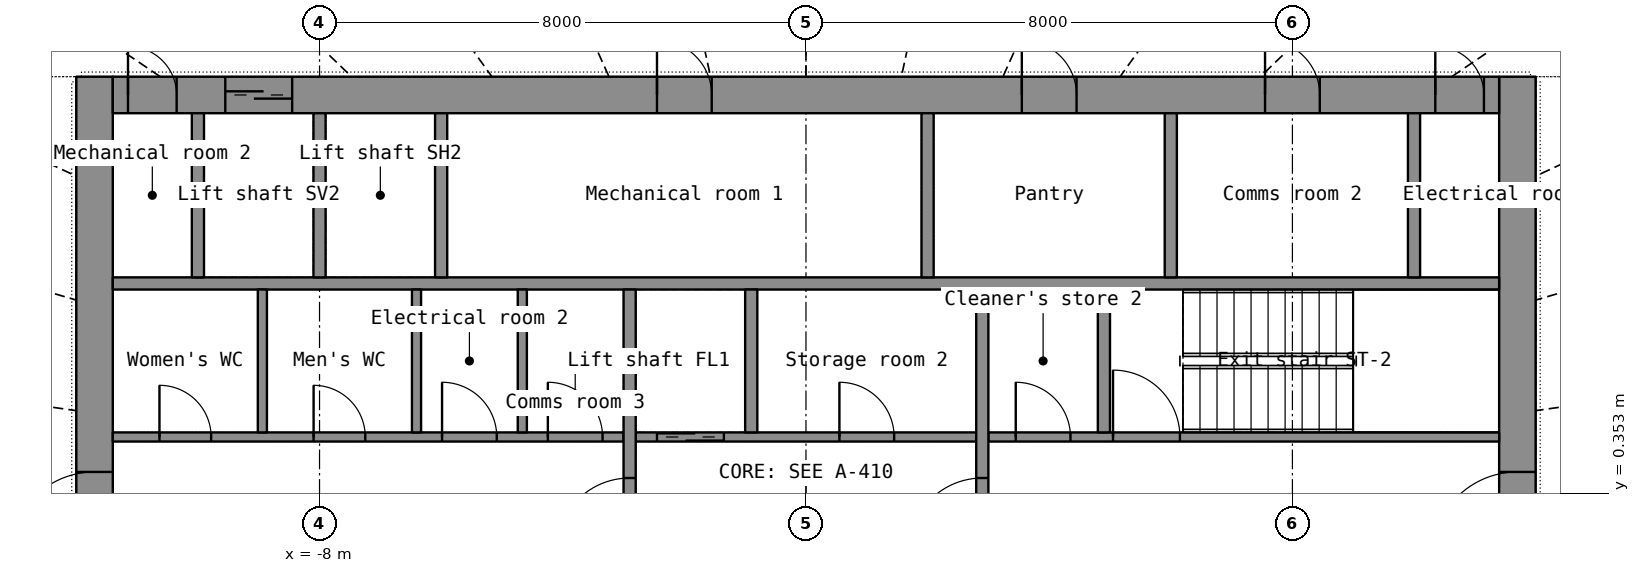
"""IFC4 building model, lengths in metres.
Left out: names, types, materials, properties, quantities, classifications, styles, units other than length and angle.
Written with IfcOpenShell. Run it as: python <this file> out.ifc"""

import sys

from ifc_helpers import new_model, si_unit, direction, frame, frame_2d, origin, place, context, subcontext, project, spatial, rectangle, extrude, element, fill, save


model = new_model("IFC4")
c1 = context("Model", 3, precision=1e-05, world=origin(), true_north=direction((0.0, 1.0)))
c2 = subcontext(c1, "Body", "Model", "MODEL_VIEW")
j1 = project(units=[si_unit("LENGTHUNIT", "METRE"), si_unit("PLANEANGLEUNIT", "RADIAN")], contexts=[c1])
p1 = place(None, origin())
s1 = spatial("IfcSite", under=j1, at=p1, CompositionType="ELEMENT")
p2 = place(p1, origin())
s2 = spatial("IfcBuilding", under=s1, at=p2, CompositionType="ELEMENT")
p3 = place(p2, frame((0.0, 0.0, 63.0)))
s3 = spatial("IfcBuildingStorey", under=s2, at=p3, CompositionType="ELEMENT", Elevation=63.0)
p4 = place(p3, frame((-11.7, -7.2, 0.0), z_axis=(0.0, 0.0, 1.0), x_axis=(0.0, 1.0, 0.0)))
e1 = element("IfcWall", 1, at=p4, inside=s3, PredefinedType="SHEAR", context=c2, shape_type="SweptSolid", body=[
    extrude(rectangle(XDim=14.4, YDim=0.6, at=frame_2d((7.2, 0.0))), origin(), (0.0, 0.0, 1.0), 3.3),
])
p5 = place(p4, frame((6.5, 0.0, 0.0)))
e2 = element("IfcOpeningElement", 2, at=p5, cuts=e1, PredefinedType="OPENING", context=c2, shape_type="SweptSolid", body=[
    extrude(rectangle(XDim=1.4, YDim=2.2, at=frame_2d((0.7, 1.1))), frame((0.0, 0.31, 0.0), z_axis=(0.0, -1.0, 0.0), x_axis=(1.0, 0.0, 0.0)), (0.0, 0.0, 1.0), 0.62),
])
p6 = place(p3, frame((11.7, -7.2, 0.0), z_axis=(0.0, 0.0, 1.0), x_axis=(0.0, 1.0, 0.0)))
e3 = element("IfcWall", 3, at=p6, inside=s3, PredefinedType="SHEAR", context=c2, shape_type="SweptSolid", body=[
    extrude(rectangle(XDim=14.4, YDim=0.6, at=frame_2d((7.2, 0.0))), origin(), (0.0, 0.0, 1.0), 3.3),
])
p7 = place(p6, frame((6.5, 0.0, 0.0)))
e4 = element("IfcOpeningElement", 4, at=p7, cuts=e3, PredefinedType="OPENING", context=c2, shape_type="SweptSolid", body=[
    extrude(rectangle(XDim=1.4, YDim=2.2, at=frame_2d((0.7, 1.1))), frame((0.0, 0.31, 0.0), z_axis=(0.0, -1.0, 0.0), x_axis=(1.0, 0.0, 0.0)), (0.0, 0.0, 1.0), 0.62),
])
p8 = place(p3, frame((-11.4, 6.9, 0.0), z_axis=(0.0, 0.0, 1.0), x_axis=(1.0, 0.0, 0.0)))
e5 = element("IfcWall", 5, at=p8, inside=s3, PredefinedType="SHEAR", context=c2, shape_type="SweptSolid", body=[
    extrude(rectangle(XDim=22.8, YDim=0.6, at=frame_2d((11.4, 0.0))), origin(), (0.0, 0.0, 1.0), 3.3),
])
p9 = place(p8, frame((1.85, 0.0, 0.0)))
e6 = element("IfcOpeningElement", 6, at=p9, cuts=e5, PredefinedType="OPENING", context=c2, shape_type="SweptSolid", body=[
    extrude(rectangle(XDim=1.1, YDim=2.2, at=frame_2d((0.55, 1.1))), frame((0.0, 0.31, 0.0), z_axis=(0.0, -1.0, 0.0), x_axis=(1.0, 0.0, 0.0)), (0.0, 0.0, 1.0), 0.62),
])
p10 = place(p8, frame((8.95, 0.0, 0.0)))
e7 = element("IfcOpeningElement", 7, at=p10, cuts=e5, PredefinedType="OPENING", context=c2, shape_type="SweptSolid", body=[
    extrude(rectangle(XDim=0.9, YDim=2.1, at=frame_2d((0.45, 1.05))), frame((0.0, 0.31, 0.0), z_axis=(0.0, -1.0, 0.0), x_axis=(1.0, 0.0, 0.0)), (0.0, 0.0, 1.0), 0.62),
])
p11 = place(p8, frame((14.95, 0.0, 0.0)))
e8 = element("IfcOpeningElement", 8, at=p11, cuts=e5, PredefinedType="OPENING", context=c2, shape_type="SweptSolid", body=[
    extrude(rectangle(XDim=0.9, YDim=2.1, at=frame_2d((0.45, 1.05))), frame((0.0, 0.31, 0.0), z_axis=(0.0, -1.0, 0.0), x_axis=(1.0, 0.0, 0.0)), (0.0, 0.0, 1.0), 0.62),
])
p12 = place(p8, frame((18.95, 0.0, 0.0)))
e9 = element("IfcOpeningElement", 9, at=p12, cuts=e5, PredefinedType="OPENING", context=c2, shape_type="SweptSolid", body=[
    extrude(rectangle(XDim=0.9, YDim=2.1, at=frame_2d((0.45, 1.05))), frame((0.0, 0.31, 0.0), z_axis=(0.0, -1.0, 0.0), x_axis=(1.0, 0.0, 0.0)), (0.0, 0.0, 1.0), 0.62),
])
p13 = place(p8, frame((0.25, 0.0, 0.0)))
e10 = element("IfcOpeningElement", 10, at=p13, cuts=e5, PredefinedType="OPENING", context=c2, shape_type="SweptSolid", body=[
    extrude(rectangle(XDim=0.8, YDim=2.05, at=frame_2d((0.4, 1.025))), frame((0.0, 0.31, 0.0), z_axis=(0.0, -1.0, 0.0), x_axis=(1.0, 0.0, 0.0)), (0.0, 0.0, 1.0), 0.62),
])
p14 = place(p8, frame((21.75, 0.0, 0.0)))
e11 = element("IfcOpeningElement", 11, at=p14, cuts=e5, PredefinedType="OPENING", context=c2, shape_type="SweptSolid", body=[
    extrude(rectangle(XDim=0.8, YDim=2.05, at=frame_2d((0.4, 1.025))), frame((0.0, 0.31, 0.0), z_axis=(0.0, -1.0, 0.0), x_axis=(1.0, 0.0, 0.0)), (0.0, 0.0, 1.0), 0.62),
])
p15 = place(p3, frame((-11.4, 3.8, 0.0), z_axis=(0.0, 0.0, 1.0), x_axis=(1.0, 0.0, 0.0)))
e12 = element("IfcWall", 12, at=p15, inside=s3, PredefinedType="SHEAR", context=c2, shape_type="SweptSolid", body=[
    extrude(rectangle(XDim=22.8, YDim=0.2, at=frame_2d((11.4, 0.0))), origin(), (0.0, 0.0, 1.0), 3.3),
])
for number, where, z_axis, x_axis in (
    (13, (-10.0, 3.9, 0.0), (0.0, 0.0, 1.0), (0.0, 1.0, 0.0)),
    (14, (-8.0, 3.9, 0.0), (0.0, 0.0, 1.0), (0.0, 1.0, 0.0)),
    (15, (-6.0, 3.9, 0.0), (0.0, 0.0, 1.0), (0.0, 1.0, 0.0)),
    (16, (10.0, 3.9, 0.0), (0.0, 0.0, 1.0), (0.0, 1.0, 0.0)),
):
    element("IfcWall", number, at=place(p3, frame(where, z_axis=z_axis, x_axis=x_axis)), inside=s3, PredefinedType="SHEAR", context=c2, shape_type="SweptSolid", body=[
        extrude(rectangle(XDim=2.7, YDim=0.2, at=frame_2d((1.35, 0.0))), origin(), (0.0, 0.0, 1.0), 3.3),
    ])
for number, where, z_axis, x_axis in (
    (17, (2.0, 3.9, 0.0), (0.0, 0.0, 1.0), (0.0, 1.0, 0.0)),
    (18, (6.0, 3.9, 0.0), (0.0, 0.0, 1.0), (0.0, 1.0, 0.0)),
):
    element("IfcWall", number, at=place(p3, frame(where, z_axis=z_axis, x_axis=x_axis)), inside=s3, PredefinedType="PARTITIONING", context=c2, shape_type="SweptSolid", body=[
        extrude(rectangle(XDim=2.7, YDim=0.2, at=frame_2d((1.35, 0.0))), origin(), (0.0, 0.0, 1.0), 3.3),
    ])
p16 = place(p3, frame((-11.4, 1.275, 0.0), z_axis=(0.0, 0.0, 1.0), x_axis=(1.0, 0.0, 0.0)))
e19 = element("IfcWall", 19, at=p16, inside=s3, PredefinedType="PARTITIONING", context=c2, shape_type="SweptSolid", body=[
    extrude(rectangle(XDim=8.4, YDim=0.15, at=frame_2d((4.2, 0.0))), origin(), (0.0, 0.0, 1.0), 3.3),
])
p17 = place(p16, frame((0.768, 0.0, 0.0)))
e20 = element("IfcOpeningElement", 20, at=p17, cuts=e19, PredefinedType="OPENING", context=c2, shape_type="SweptSolid", body=[
    extrude(rectangle(XDim=0.85, YDim=2.1, at=frame_2d((0.425, 1.05))), frame((0.0, 0.085, 0.0), z_axis=(0.0, -1.0, 0.0), x_axis=(1.0, 0.0, 0.0)), (0.0, 0.0, 1.0), 0.17),
])
p18 = place(p16, frame((3.302, 0.0, 0.0)))
e21 = element("IfcOpeningElement", 21, at=p18, cuts=e19, PredefinedType="OPENING", context=c2, shape_type="SweptSolid", body=[
    extrude(rectangle(XDim=0.85, YDim=2.1, at=frame_2d((0.425, 1.05))), frame((0.0, 0.085, 0.0), z_axis=(0.0, -1.0, 0.0), x_axis=(1.0, 0.0, 0.0)), (0.0, 0.0, 1.0), 0.17),
])
p19 = place(p16, frame((5.415, 0.0, 0.0)))
e22 = element("IfcOpeningElement", 22, at=p19, cuts=e19, PredefinedType="OPENING", context=c2, shape_type="SweptSolid", body=[
    extrude(rectangle(XDim=0.9, YDim=2.1, at=frame_2d((0.45, 1.05))), frame((0.0, 0.085, 0.0), z_axis=(0.0, -1.0, 0.0), x_axis=(1.0, 0.0, 0.0)), (0.0, 0.0, 1.0), 0.17),
])
p20 = place(p16, frame((7.155, 0.0, 0.0)))
e23 = element("IfcOpeningElement", 23, at=p20, cuts=e19, PredefinedType="OPENING", context=c2, shape_type="SweptSolid", body=[
    extrude(rectangle(XDim=0.9, YDim=2.1, at=frame_2d((0.45, 1.05))), frame((0.0, 0.085, 0.0), z_axis=(0.0, -1.0, 0.0), x_axis=(1.0, 0.0, 0.0)), (0.0, 0.0, 1.0), 0.17),
])
p21 = place(p3, frame((-2.8, 1.275, 0.0), z_axis=(0.0, 0.0, 1.0), x_axis=(1.0, 0.0, 0.0)))
e24 = element("IfcWall", 24, at=p21, inside=s3, PredefinedType="SHEAR", context=c2, shape_type="SweptSolid", body=[
    extrude(rectangle(XDim=5.6, YDim=0.15, at=frame_2d((2.8, 0.0))), origin(), (0.0, 0.0, 1.0), 3.3),
])
p22 = place(p21, frame((0.35, 0.0, 0.0)))
e25 = element("IfcOpeningElement", 25, at=p22, cuts=e24, PredefinedType="OPENING", context=c2, shape_type="SweptSolid", body=[
    extrude(rectangle(XDim=1.1, YDim=2.2, at=frame_2d((0.55, 1.1))), frame((0.0, 0.085, 0.0), z_axis=(0.0, -1.0, 0.0), x_axis=(1.0, 0.0, 0.0)), (0.0, 0.0, 1.0), 0.17),
])
p23 = place(p21, frame((3.35, 0.0, 0.0)))
e26 = element("IfcOpeningElement", 26, at=p23, cuts=e24, PredefinedType="OPENING", context=c2, shape_type="SweptSolid", body=[
    extrude(rectangle(XDim=0.9, YDim=2.1, at=frame_2d((0.45, 1.05))), frame((0.0, 0.085, 0.0), z_axis=(0.0, -1.0, 0.0), x_axis=(1.0, 0.0, 0.0)), (0.0, 0.0, 1.0), 0.17),
])
p24 = place(p3, frame((3.0, 1.275, 0.0), z_axis=(0.0, 0.0, 1.0), x_axis=(1.0, 0.0, 0.0)))
e27 = element("IfcWall", 27, at=p24, inside=s3, PredefinedType="SHEAR", context=c2, shape_type="SweptSolid", body=[
    extrude(rectangle(XDim=8.4, YDim=0.15, at=frame_2d((4.2, 0.0))), origin(), (0.0, 0.0, 1.0), 3.3),
])
p25 = place(p24, frame((2.05, 0.0, 0.0)))
e28 = element("IfcOpeningElement", 28, at=p25, cuts=e27, PredefinedType="OPENING", context=c2, shape_type="SweptSolid", body=[
    extrude(rectangle(XDim=1.1, YDim=2.15, at=frame_2d((0.55, 1.075))), frame((0.0, 0.085, 0.0), z_axis=(0.0, -1.0, 0.0), x_axis=(1.0, 0.0, 0.0)), (0.0, 0.0, 1.0), 0.17),
])
p26 = place(p24, frame((0.45, 0.0, 0.0)))
e29 = element("IfcOpeningElement", 29, at=p26, cuts=e27, PredefinedType="OPENING", context=c2, shape_type="SweptSolid", body=[
    extrude(rectangle(XDim=0.9, YDim=2.1, at=frame_2d((0.45, 1.05))), frame((0.0, 0.085, 0.0), z_axis=(0.0, -1.0, 0.0), x_axis=(1.0, 0.0, 0.0)), (0.0, 0.0, 1.0), 0.17),
])
p27 = place(p3, frame((-2.9, -3.7, 0.0), z_axis=(0.0, 0.0, 1.0), x_axis=(0.0, 1.0, 0.0)))
e30 = element("IfcWall", 30, at=p27, inside=s3, PredefinedType="SHEAR", context=c2, shape_type="SweptSolid", body=[
    extrude(rectangle(XDim=7.4, YDim=0.2, at=frame_2d((3.7, 0.0))), origin(), (0.0, 0.0, 1.0), 3.3),
])
p28 = place(p27, frame((3.1, 0.0, 0.0)))
e31 = element("IfcOpeningElement", 31, at=p28, cuts=e30, PredefinedType="OPENING", context=c2, shape_type="SweptSolid", body=[
    extrude(rectangle(XDim=1.2, YDim=2.2, at=frame_2d((0.6, 1.1))), frame((0.0, 0.11, 0.0), z_axis=(0.0, -1.0, 0.0), x_axis=(1.0, 0.0, 0.0)), (0.0, 0.0, 1.0), 0.22),
])
p29 = place(p3, frame((2.9, -3.7, 0.0), z_axis=(0.0, 0.0, 1.0), x_axis=(0.0, 1.0, 0.0)))
e32 = element("IfcWall", 32, at=p29, inside=s3, PredefinedType="SHEAR", context=c2, shape_type="SweptSolid", body=[
    extrude(rectangle(XDim=7.4, YDim=0.2, at=frame_2d((3.7, 0.0))), origin(), (0.0, 0.0, 1.0), 3.3),
])
p30 = place(p29, frame((3.1, 0.0, 0.0)))
e33 = element("IfcOpeningElement", 33, at=p30, cuts=e32, PredefinedType="OPENING", context=c2, shape_type="SweptSolid", body=[
    extrude(rectangle(XDim=1.2, YDim=2.2, at=frame_2d((0.6, 1.1))), frame((0.0, 0.11, 0.0), z_axis=(0.0, -1.0, 0.0), x_axis=(1.0, 0.0, 0.0)), (0.0, 0.0, 1.0), 0.22),
])
for number, where, z_axis, x_axis in (
    (34, (-0.9, 1.35, 0.0), (0.0, 0.0, 1.0), (0.0, 1.0, 0.0)),
    (35, (4.9, 1.35, 0.0), (0.0, 0.0, 1.0), (0.0, 1.0, 0.0)),
):
    element("IfcWall", number, at=place(p3, frame(where, z_axis=z_axis, x_axis=x_axis)), inside=s3, PredefinedType="SHEAR", context=c2, shape_type="SweptSolid", body=[
        extrude(rectangle(XDim=2.35, YDim=0.2, at=frame_2d((1.175, 0.0))), origin(), (0.0, 0.0, 1.0), 3.3),
    ])
for number, where, z_axis, x_axis in (
    (36, (-8.94, 1.35, 0.0), (0.0, 0.0, 1.0), (0.0, 1.0, 0.0)),
    (37, (-6.405, 1.35, 0.0), (0.0, 0.0, 1.0), (0.0, 1.0, 0.0)),
    (38, (-4.665, 1.35, 0.0), (0.0, 0.0, 1.0), (0.0, 1.0, 0.0)),
):
    element("IfcWall", number, at=place(p3, frame(where, z_axis=z_axis, x_axis=x_axis)), inside=s3, PredefinedType="PARTITIONING", context=c2, shape_type="SweptSolid", body=[
        extrude(rectangle(XDim=2.35, YDim=0.15, at=frame_2d((1.175, 0.0))), origin(), (0.0, 0.0, 1.0), 3.3),
    ])
p31 = place(p9, origin())
e39 = element("IfcDoor", 39, at=p31, inside=s3, OperationType="DOUBLE_DOOR_SLIDING", PredefinedType="DOOR", context=c2, shape_type="SweptSolid", body=[
    extrude(rectangle(XDim=1.1, YDim=2.2, at=frame_2d((0.55, 1.1))), frame((0.0, 0.025, 0.0), z_axis=(0.0, -1.0, 0.0), x_axis=(1.0, 0.0, 0.0)), (0.0, 0.0, 1.0), 0.05),
])
fill(e6, e39)
p32 = place(p10, origin())
e40 = element("IfcDoor", 40, at=p32, inside=s3, OperationType="SINGLE_SWING_LEFT", PredefinedType="DOOR", context=c2, shape_type="SweptSolid", body=[
    extrude(rectangle(XDim=0.9, YDim=2.1, at=frame_2d((0.45, 1.05))), frame((0.0, 0.025, 0.0), z_axis=(0.0, -1.0, 0.0), x_axis=(1.0, 0.0, 0.0)), (0.0, 0.0, 1.0), 0.05),
])
fill(e7, e40)
p33 = place(p11, origin())
e41 = element("IfcDoor", 41, at=p33, inside=s3, OperationType="SINGLE_SWING_LEFT", PredefinedType="DOOR", context=c2, shape_type="SweptSolid", body=[
    extrude(rectangle(XDim=0.9, YDim=2.1, at=frame_2d((0.45, 1.05))), frame((0.0, 0.025, 0.0), z_axis=(0.0, -1.0, 0.0), x_axis=(1.0, 0.0, 0.0)), (0.0, 0.0, 1.0), 0.05),
])
fill(e8, e41)
p34 = place(p12, origin())
e42 = element("IfcDoor", 42, at=p34, inside=s3, OperationType="SINGLE_SWING_LEFT", PredefinedType="DOOR", context=c2, shape_type="SweptSolid", body=[
    extrude(rectangle(XDim=0.9, YDim=2.1, at=frame_2d((0.45, 1.05))), frame((0.0, 0.025, 0.0), z_axis=(0.0, -1.0, 0.0), x_axis=(1.0, 0.0, 0.0)), (0.0, 0.0, 1.0), 0.05),
])
fill(e9, e42)
p35 = place(p13, origin())
e43 = element("IfcDoor", 43, at=p35, inside=s3, OperationType="SINGLE_SWING_LEFT", PredefinedType="DOOR", context=c2, shape_type="SweptSolid", body=[
    extrude(rectangle(XDim=0.8, YDim=2.05, at=frame_2d((0.4, 1.025))), frame((0.0, 0.025, 0.0), z_axis=(0.0, -1.0, 0.0), x_axis=(1.0, 0.0, 0.0)), (0.0, 0.0, 1.0), 0.05),
])
fill(e10, e43)
p36 = place(p14, origin())
e44 = element("IfcDoor", 44, at=p36, inside=s3, OperationType="SINGLE_SWING_LEFT", PredefinedType="DOOR", context=c2, shape_type="SweptSolid", body=[
    extrude(rectangle(XDim=0.8, YDim=2.05, at=frame_2d((0.4, 1.025))), frame((0.0, 0.025, 0.0), z_axis=(0.0, -1.0, 0.0), x_axis=(1.0, 0.0, 0.0)), (0.0, 0.0, 1.0), 0.05),
])
fill(e11, e44)
p37 = place(p5, origin())
e45 = element("IfcDoor", 45, at=p37, inside=s3, OperationType="DOUBLE_DOOR_SINGLE_SWING", PredefinedType="DOOR", context=c2, shape_type="SweptSolid", body=[
    extrude(rectangle(XDim=1.4, YDim=2.2, at=frame_2d((0.7, 1.1))), frame((0.0, 0.025, 0.0), z_axis=(0.0, -1.0, 0.0), x_axis=(1.0, 0.0, 0.0)), (0.0, 0.0, 1.0), 0.05),
])
fill(e2, e45)
p38 = place(p7, origin())
e46 = element("IfcDoor", 46, at=p38, inside=s3, OperationType="DOUBLE_DOOR_SINGLE_SWING", PredefinedType="DOOR", context=c2, shape_type="SweptSolid", body=[
    extrude(rectangle(XDim=1.4, YDim=2.2, at=frame_2d((0.7, 1.1))), frame((0.0, 0.025, 0.0), z_axis=(0.0, -1.0, 0.0), x_axis=(1.0, 0.0, 0.0)), (0.0, 0.0, 1.0), 0.05),
])
fill(e4, e46)
p39 = place(p28, origin())
e47 = element("IfcDoor", 47, at=p39, inside=s3, OperationType="SINGLE_SWING_LEFT", PredefinedType="DOOR", context=c2, shape_type="SweptSolid", body=[
    extrude(rectangle(XDim=1.2, YDim=2.2, at=frame_2d((0.6, 1.1))), frame((0.0, 0.025, 0.0), z_axis=(0.0, -1.0, 0.0), x_axis=(1.0, 0.0, 0.0)), (0.0, 0.0, 1.0), 0.05),
])
fill(e31, e47)
p40 = place(p30, origin())
e48 = element("IfcDoor", 48, at=p40, inside=s3, OperationType="SINGLE_SWING_LEFT", PredefinedType="DOOR", context=c2, shape_type="SweptSolid", body=[
    extrude(rectangle(XDim=1.2, YDim=2.2, at=frame_2d((0.6, 1.1))), frame((0.0, 0.025, 0.0), z_axis=(0.0, -1.0, 0.0), x_axis=(1.0, 0.0, 0.0)), (0.0, 0.0, 1.0), 0.05),
])
fill(e33, e48)
p41 = place(p22, origin())
e49 = element("IfcDoor", 49, at=p41, inside=s3, OperationType="DOUBLE_DOOR_SLIDING", PredefinedType="DOOR", context=c2, shape_type="SweptSolid", body=[
    extrude(rectangle(XDim=1.1, YDim=2.2, at=frame_2d((0.55, 1.1))), frame((0.0, 0.025, 0.0), z_axis=(0.0, -1.0, 0.0), x_axis=(1.0, 0.0, 0.0)), (0.0, 0.0, 1.0), 0.05),
])
fill(e25, e49)
p42 = place(p25, origin())
e50 = element("IfcDoor", 50, at=p42, inside=s3, OperationType="SINGLE_SWING_LEFT", PredefinedType="DOOR", context=c2, shape_type="SweptSolid", body=[
    extrude(rectangle(XDim=1.1, YDim=2.15, at=frame_2d((0.55, 1.075))), frame((0.0, 0.025, 0.0), z_axis=(0.0, -1.0, 0.0), x_axis=(1.0, 0.0, 0.0)), (0.0, 0.0, 1.0), 0.05),
])
fill(e28, e50)
p43 = place(p17, origin())
e51 = element("IfcDoor", 51, at=p43, inside=s3, OperationType="SINGLE_SWING_LEFT", PredefinedType="DOOR", context=c2, shape_type="SweptSolid", body=[
    extrude(rectangle(XDim=0.85, YDim=2.1, at=frame_2d((0.425, 1.05))), frame((0.0, 0.025, 0.0), z_axis=(0.0, -1.0, 0.0), x_axis=(1.0, 0.0, 0.0)), (0.0, 0.0, 1.0), 0.05),
])
fill(e20, e51)
p44 = place(p18, origin())
e52 = element("IfcDoor", 52, at=p44, inside=s3, OperationType="SINGLE_SWING_LEFT", PredefinedType="DOOR", context=c2, shape_type="SweptSolid", body=[
    extrude(rectangle(XDim=0.85, YDim=2.1, at=frame_2d((0.425, 1.05))), frame((0.0, 0.025, 0.0), z_axis=(0.0, -1.0, 0.0), x_axis=(1.0, 0.0, 0.0)), (0.0, 0.0, 1.0), 0.05),
])
fill(e21, e52)
p45 = place(p19, origin())
e53 = element("IfcDoor", 53, at=p45, inside=s3, OperationType="SINGLE_SWING_LEFT", PredefinedType="DOOR", context=c2, shape_type="SweptSolid", body=[
    extrude(rectangle(XDim=0.9, YDim=2.1, at=frame_2d((0.45, 1.05))), frame((0.0, 0.025, 0.0), z_axis=(0.0, -1.0, 0.0), x_axis=(1.0, 0.0, 0.0)), (0.0, 0.0, 1.0), 0.05),
])
fill(e22, e53)
p46 = place(p20, origin())
e54 = element("IfcDoor", 54, at=p46, inside=s3, OperationType="SINGLE_SWING_LEFT", PredefinedType="DOOR", context=c2, shape_type="SweptSolid", body=[
    extrude(rectangle(XDim=0.9, YDim=2.1, at=frame_2d((0.45, 1.05))), frame((0.0, 0.025, 0.0), z_axis=(0.0, -1.0, 0.0), x_axis=(1.0, 0.0, 0.0)), (0.0, 0.0, 1.0), 0.05),
])
fill(e23, e54)
p47 = place(p23, origin())
e55 = element("IfcDoor", 55, at=p47, inside=s3, OperationType="SINGLE_SWING_LEFT", PredefinedType="DOOR", context=c2, shape_type="SweptSolid", body=[
    extrude(rectangle(XDim=0.9, YDim=2.1, at=frame_2d((0.45, 1.05))), frame((0.0, 0.025, 0.0), z_axis=(0.0, -1.0, 0.0), x_axis=(1.0, 0.0, 0.0)), (0.0, 0.0, 1.0), 0.05),
])
fill(e26, e55)
p48 = place(p26, origin())
e56 = element("IfcDoor", 56, at=p48, inside=s3, OperationType="SINGLE_SWING_LEFT", PredefinedType="DOOR", context=c2, shape_type="SweptSolid", body=[
    extrude(rectangle(XDim=0.9, YDim=2.1, at=frame_2d((0.45, 1.05))), frame((0.0, 0.025, 0.0), z_axis=(0.0, -1.0, 0.0), x_axis=(1.0, 0.0, 0.0)), (0.0, 0.0, 1.0), 0.05),
])
fill(e29, e56)
save(model, sys.argv[1])
